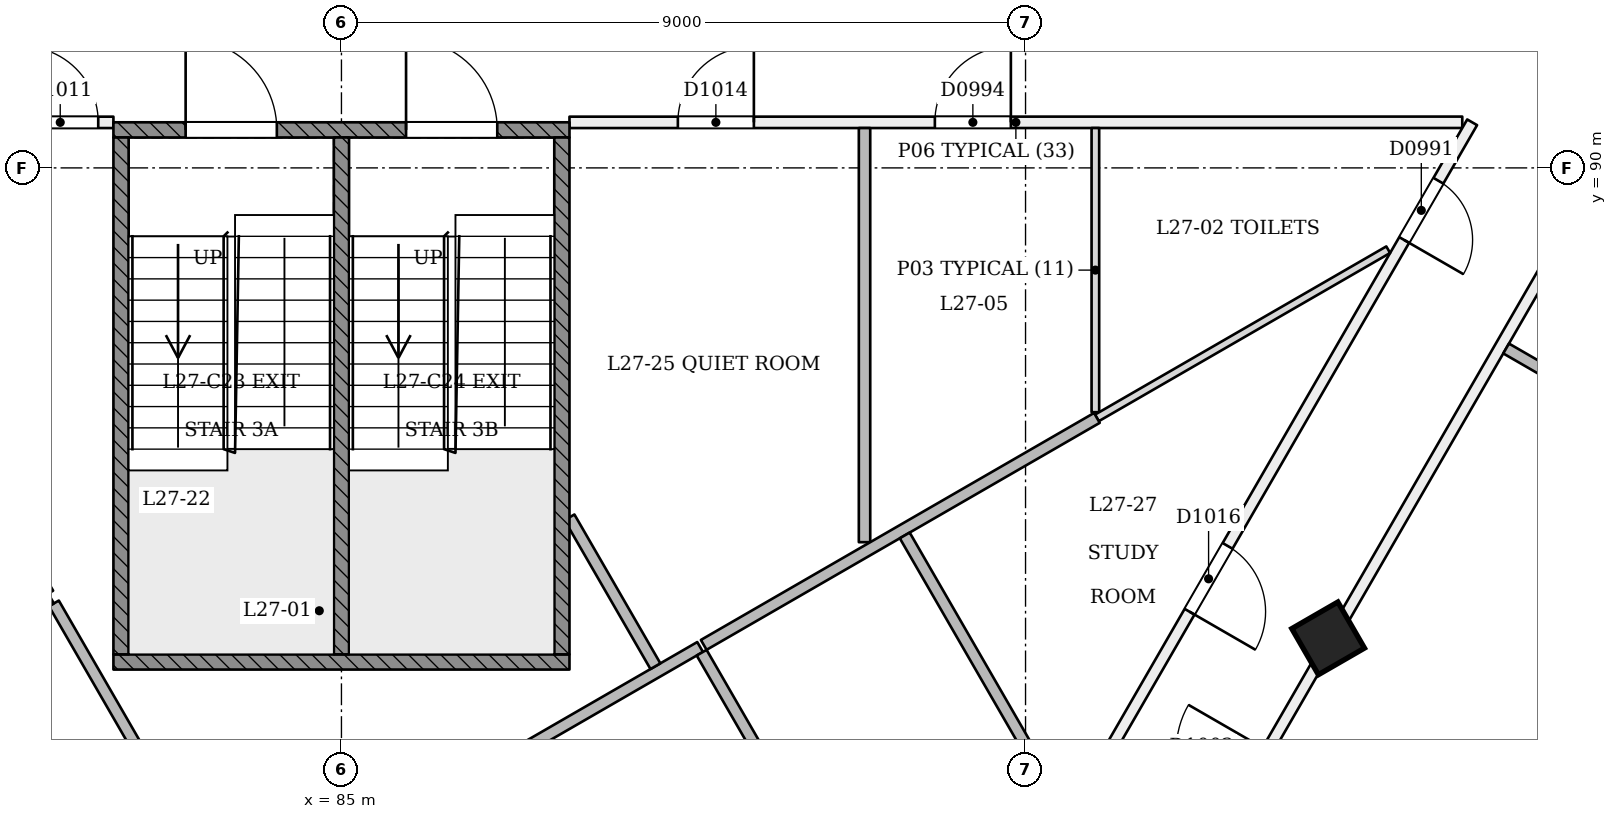
"""IFC4 building model, lengths in metres.
Left out: names, types, materials, properties, quantities, classifications, styles, units other than length and angle.
Written with IfcOpenShell. Run it as: python <this file> out.ifc"""

import sys

from ifc_helpers import new_model, si_unit, direction, frame, frame_2d, origin, origin_2d, place, context, subcontext, project, spatial, rectangle, extrude, element, fill, save


model = new_model("IFC4")
c1 = context("Model", 3, precision=1e-05, world=origin(), true_north=direction((0.0, 1.0)))
c2 = subcontext(c1, "Body", "Model", "MODEL_VIEW")
j1 = project(units=[si_unit("LENGTHUNIT", "METRE"), si_unit("PLANEANGLEUNIT", "RADIAN")], contexts=[c1])
p1 = place(None, origin())
s1 = spatial("IfcSite", under=j1, at=p1, CompositionType="ELEMENT")
p2 = place(p1, origin())
s2 = spatial("IfcBuilding", under=s1, at=p2, CompositionType="ELEMENT")
p3 = place(p2, frame((0.0, 0.0, 108.0)))
s3 = spatial("IfcBuildingStorey", under=s2, at=p3, CompositionType="ELEMENT", Elevation=108.0)
p4 = place(p3, frame((98.008, 83.764, -0.021), z_axis=(-0.022221406801, 0.038413224561, 0.999014831351), x_axis=(-0.499508315684, -0.866024881685, 0.022188890572)))
e1 = element("IfcColumn", 1, at=p4, inside=s3, PredefinedType="COLUMN", context=c2, shape_type="SweptSolid", body=[
    extrude(rectangle(XDim=0.7, YDim=0.7, at=origin_2d()), origin(), (0.0, 0.0, 1.0), 3.604),
])
p5 = place(p3, frame((88.0, 90.599, 0.0), z_axis=(0.0, 0.0, 1.0), x_axis=(0.999999996544, 8.3141069e-05, 0.0)))
e2 = element("IfcWall", 2, at=p5, inside=s3, PredefinedType="PARTITIONING", context=c2, shape_type="SweptSolid", body=[
    extrude(rectangle(XDim=11.746, YDim=0.15, at=frame_2d((5.873, 0.0))), origin(), (0.0, 0.0, 1.0), 3.1),
])
p6 = place(p5, frame((4.807, 0.0, 0.0)))
e3 = element("IfcOpeningElement", 3, at=p6, cuts=e2, PredefinedType="OPENING", context=c2, shape_type="SweptSolid", body=[
    extrude(rectangle(XDim=1.0, YDim=2.1, at=frame_2d((0.5, 1.05))), frame((0.0, 0.085, 0.0), z_axis=(0.0, -1.0, 0.0), x_axis=(1.0, 0.0, 0.0)), (0.0, 0.0, 1.0), 0.171),
])
p7 = place(p5, frame((1.426, 0.0, 0.0)))
e4 = element("IfcOpeningElement", 4, at=p7, cuts=e2, PredefinedType="OPENING", context=c2, shape_type="SweptSolid", body=[
    extrude(rectangle(XDim=1.0, YDim=2.1, at=frame_2d((0.5, 1.05))), frame((0.0, 0.085, 0.0), z_axis=(0.0, -1.0, 0.0), x_axis=(1.0, 0.0, 0.0)), (0.0, 0.0, 1.0), 0.171),
])
p8 = place(p3, frame((99.876, 90.6, 0.0), z_axis=(0.0, 0.0, 1.0), x_axis=(-0.499999508355, -0.866025687636, 0.0)))
e5 = element("IfcWall", 5, at=p8, inside=s3, PredefinedType="PARTITIONING", context=c2, shape_type="SweptSolid", body=[
    extrude(rectangle(XDim=29.622, YDim=0.15, at=frame_2d((14.811, 0.0))), origin(), (0.0, 0.0, 1.0), 3.1),
])
p9 = place(p8, frame((0.888, 0.0, 0.0)))
e6 = element("IfcOpeningElement", 6, at=p9, cuts=e5, PredefinedType="OPENING", context=c2, shape_type="SweptSolid", body=[
    extrude(rectangle(XDim=0.9, YDim=2.1, at=frame_2d((0.45, 1.05))), frame((0.0, 0.085, 0.0), z_axis=(0.0, -1.0, 0.0), x_axis=(1.0, 0.0, 0.0)), (0.0, 0.0, 1.0), 0.171),
])
p10 = place(p8, frame((19.95, 0.0, 0.0)))
e7 = element("IfcOpeningElement", 7, at=p10, cuts=e5, PredefinedType="OPENING", context=c2, shape_type="SweptSolid", body=[
    extrude(rectangle(XDim=1.0, YDim=2.1, at=frame_2d((0.5, 1.05))), frame((0.0, 0.085, 0.0), z_axis=(0.0, -1.0, 0.0), x_axis=(1.0, 0.0, 0.0)), (0.0, 0.0, 1.0), 0.171),
])
p11 = place(p8, frame((14.284, 0.0, 0.0)))
e8 = element("IfcOpeningElement", 8, at=p11, cuts=e5, PredefinedType="OPENING", context=c2, shape_type="SweptSolid", body=[
    extrude(rectangle(XDim=1.0, YDim=2.1, at=frame_2d((0.5, 1.05))), frame((0.0, 0.085, 0.0), z_axis=(0.0, -1.0, 0.0), x_axis=(1.0, 0.0, 0.0)), (0.0, 0.0, 1.0), 0.171),
])
p12 = place(p8, frame((6.435, 0.0, 0.0)))
e9 = element("IfcOpeningElement", 9, at=p12, cuts=e5, PredefinedType="OPENING", context=c2, shape_type="SweptSolid", body=[
    extrude(rectangle(XDim=1.0, YDim=2.1, at=frame_2d((0.5, 1.05))), frame((0.0, 0.085, 0.0), z_axis=(0.0, -1.0, 0.0), x_axis=(1.0, 0.0, 0.0)), (0.0, 0.0, 1.0), 0.171),
])
p13 = place(p8, frame((10.748, 0.0, 0.0)))
e10 = element("IfcOpeningElement", 10, at=p13, cuts=e5, PredefinedType="OPENING", context=c2, shape_type="SweptSolid", body=[
    extrude(rectangle(XDim=1.0, YDim=2.1, at=frame_2d((0.5, 1.05))), frame((0.0, 0.085, 0.0), z_axis=(0.0, -1.0, 0.0), x_axis=(1.0, 0.0, 0.0)), (0.0, 0.0, 1.0), 0.171),
])
p14 = place(p3, frame((63.866, 97.84, 0.0), z_axis=(0.0, 0.0, 1.0), x_axis=(0.499996899578, -0.866027193807, 0.0)))
e11 = element("IfcWall", 11, at=p14, inside=s3, PredefinedType="PARTITIONING", context=c2, shape_type="SweptSolid", body=[
    extrude(rectangle(XDim=41.505, YDim=0.15, at=frame_2d((20.752, 0.0))), origin(), (0.0, 0.0, 1.0), 2.7),
])
p15 = place(p14, frame((2.792, 0.0, 0.0)))
e12 = element("IfcOpeningElement", 12, at=p15, cuts=e11, PredefinedType="OPENING", context=c2, shape_type="SweptSolid", body=[
    extrude(rectangle(XDim=1.2, YDim=2.1, at=frame_2d((0.6, 1.05))), frame((0.0, 0.085, 0.0), z_axis=(0.0, -1.0, 0.0), x_axis=(1.0, 0.0, 0.0)), (0.0, 0.0, 1.0), 0.171),
])
p16 = place(p14, frame((11.153, 0.0, 0.0)))
e13 = element("IfcOpeningElement", 13, at=p16, cuts=e11, PredefinedType="OPENING", context=c2, shape_type="SweptSolid", body=[
    extrude(rectangle(XDim=1.2, YDim=2.1, at=frame_2d((0.6, 1.05))), frame((0.0, 0.085, 0.0), z_axis=(0.0, -1.0, 0.0), x_axis=(1.0, 0.0, 0.0)), (0.0, 0.0, 1.0), 0.171),
])
p17 = place(p14, frame((22.403, 0.0, 0.0)))
e14 = element("IfcOpeningElement", 14, at=p17, cuts=e11, PredefinedType="OPENING", context=c2, shape_type="SweptSolid", body=[
    extrude(rectangle(XDim=1.2, YDim=2.1, at=frame_2d((0.6, 1.05))), frame((0.0, 0.085, 0.0), z_axis=(0.0, -1.0, 0.0), x_axis=(1.0, 0.0, 0.0)), (0.0, 0.0, 1.0), 0.171),
])
p18 = place(p14, frame((32.553, 0.0, 0.0)))
e15 = element("IfcOpeningElement", 15, at=p18, cuts=e11, PredefinedType="OPENING", context=c2, shape_type="SweptSolid", body=[
    extrude(rectangle(XDim=1.2, YDim=2.1, at=frame_2d((0.6, 1.05))), frame((0.0, 0.085, 0.0), z_axis=(0.0, -1.0, 0.0), x_axis=(1.0, 0.0, 0.0)), (0.0, 0.0, 1.0), 0.171),
])
p19 = place(p14, frame((39.864, 0.0, 0.0)))
e16 = element("IfcOpeningElement", 16, at=p19, cuts=e11, PredefinedType="OPENING", context=c2, shape_type="SweptSolid", body=[
    extrude(rectangle(XDim=1.0, YDim=2.1, at=frame_2d((0.5, 1.05))), frame((0.0, 0.085, 0.0), z_axis=(0.0, -1.0, 0.0), x_axis=(1.0, 0.0, 0.0)), (0.0, 0.0, 1.0), 0.171),
])
p20 = place(p3, frame((85.381, 61.895, 0.0), z_axis=(0.0, 0.0, 1.0), x_axis=(0.499996899578, 0.866027193807, 0.0)))
e17 = element("IfcWall", 17, at=p20, inside=s3, PredefinedType="PARTITIONING", context=c2, shape_type="SweptSolid", body=[
    extrude(rectangle(XDim=41.505, YDim=0.15, at=frame_2d((20.752, 0.0))), origin(), (0.0, 0.0, 1.0), 2.7),
])
p21 = place(p20, frame((0.226, 0.0, 0.0)))
e18 = element("IfcOpeningElement", 18, at=p21, cuts=e17, PredefinedType="OPENING", context=c2, shape_type="SweptSolid", body=[
    extrude(rectangle(XDim=1.2, YDim=2.1, at=frame_2d((0.6, 1.05))), frame((0.0, 0.085, 0.0), z_axis=(0.0, -1.0, 0.0), x_axis=(1.0, 0.0, 0.0)), (0.0, 0.0, 1.0), 0.171),
])
p22 = place(p20, frame((8.903, 0.0, 0.0)))
e19 = element("IfcOpeningElement", 19, at=p22, cuts=e17, PredefinedType="OPENING", context=c2, shape_type="SweptSolid", body=[
    extrude(rectangle(XDim=1.2, YDim=2.1, at=frame_2d((0.6, 1.05))), frame((0.0, 0.085, 0.0), z_axis=(0.0, -1.0, 0.0), x_axis=(1.0, 0.0, 0.0)), (0.0, 0.0, 1.0), 0.171),
])
p23 = place(p20, frame((22.403, 0.0, 0.0)))
e20 = element("IfcOpeningElement", 20, at=p23, cuts=e17, PredefinedType="OPENING", context=c2, shape_type="SweptSolid", body=[
    extrude(rectangle(XDim=1.2, YDim=2.1, at=frame_2d((0.6, 1.05))), frame((0.0, 0.085, 0.0), z_axis=(0.0, -1.0, 0.0), x_axis=(1.0, 0.0, 0.0)), (0.0, 0.0, 1.0), 0.171),
])
p24 = place(p20, frame((32.553, 0.0, 0.0)))
e21 = element("IfcOpeningElement", 21, at=p24, cuts=e17, PredefinedType="OPENING", context=c2, shape_type="SweptSolid", body=[
    extrude(rectangle(XDim=1.2, YDim=2.1, at=frame_2d((0.6, 1.05))), frame((0.0, 0.085, 0.0), z_axis=(0.0, -1.0, 0.0), x_axis=(1.0, 0.0, 0.0)), (0.0, 0.0, 1.0), 0.171),
])
p25 = place(p20, frame((40.024, 0.0, 0.0)))
e22 = element("IfcOpeningElement", 22, at=p25, cuts=e17, PredefinedType="OPENING", context=c2, shape_type="SweptSolid", body=[
    extrude(rectangle(XDim=1.2, YDim=2.1, at=frame_2d((0.6, 1.05))), frame((0.0, 0.085, 0.0), z_axis=(0.0, -1.0, 0.0), x_axis=(1.0, 0.0, 0.0)), (0.0, 0.0, 1.0), 0.171),
])
p26 = place(p3, frame((85.0, 64.834, 0.0), z_axis=(0.0, 0.0, 1.0), x_axis=(-0.499998535175, 0.8660262495, 0.0)))
e23 = element("IfcWall", 23, at=p26, inside=s3, PredefinedType="PARTITIONING", context=c2, shape_type="SweptSolid", body=[
    extrude(rectangle(XDim=29.751, YDim=0.15, at=frame_2d((14.876, 0.0))), origin(), (0.0, 0.0, 1.0), 3.1),
])
p27 = place(p26, frame((11.629, 0.0, 0.0)))
e24 = element("IfcOpeningElement", 24, at=p27, cuts=e23, PredefinedType="OPENING", context=c2, shape_type="SweptSolid", body=[
    extrude(rectangle(XDim=1.2, YDim=2.1, at=frame_2d((0.6, 1.05))), frame((0.0, 0.085, 0.0), z_axis=(0.0, -1.0, 0.0), x_axis=(1.0, 0.0, 0.0)), (0.0, 0.0, 1.0), 0.171),
])
p28 = place(p26, frame((8.136, 0.0, 0.0)))
e25 = element("IfcOpeningElement", 25, at=p28, cuts=e23, PredefinedType="OPENING", context=c2, shape_type="SweptSolid", body=[
    extrude(rectangle(XDim=1.2, YDim=2.1, at=frame_2d((0.6, 1.05))), frame((0.0, 0.085, 0.0), z_axis=(0.0, -1.0, 0.0), x_axis=(1.0, 0.0, 0.0)), (0.0, 0.0, 1.0), 0.171),
])
p29 = place(p26, frame((15.887, 0.0, 0.0)))
e26 = element("IfcOpeningElement", 26, at=p29, cuts=e23, PredefinedType="OPENING", context=c2, shape_type="SweptSolid", body=[
    extrude(rectangle(XDim=1.0, YDim=2.1, at=frame_2d((0.5, 1.05))), frame((0.0, 0.085, 0.0), z_axis=(0.0, -1.0, 0.0), x_axis=(1.0, 0.0, 0.0)), (0.0, 0.0, 1.0), 0.171),
])
p30 = place(p26, frame((3.673, 0.0, 0.0)))
e27 = element("IfcOpeningElement", 27, at=p30, cuts=e23, PredefinedType="OPENING", context=c2, shape_type="SweptSolid", body=[
    extrude(rectangle(XDim=1.0, YDim=2.1, at=frame_2d((0.5, 1.05))), frame((0.0, 0.085, 0.0), z_axis=(0.0, -1.0, 0.0), x_axis=(1.0, 0.0, 0.0)), (0.0, 0.0, 1.0), 0.171),
])
p31 = place(p26, frame((20.45, 0.0, 0.0)))
e28 = element("IfcOpeningElement", 28, at=p31, cuts=e23, PredefinedType="OPENING", context=c2, shape_type="SweptSolid", body=[
    extrude(rectangle(XDim=1.0, YDim=2.1, at=frame_2d((0.5, 1.05))), frame((0.0, 0.085, 0.0), z_axis=(0.0, -1.0, 0.0), x_axis=(1.0, 0.0, 0.0)), (0.0, 0.0, 1.0), 0.171),
])
p32 = place(p26, frame((25.486, 0.0, 0.0)))
e29 = element("IfcOpeningElement", 29, at=p32, cuts=e23, PredefinedType="OPENING", context=c2, shape_type="SweptSolid", body=[
    extrude(rectangle(XDim=1.0, YDim=2.1, at=frame_2d((0.5, 1.05))), frame((0.0, 0.085, 0.0), z_axis=(0.0, -1.0, 0.0), x_axis=(1.0, 0.0, 0.0)), (0.0, 0.0, 1.0), 0.171),
])
p33 = place(p3, frame((70.254, 90.6, 0.0), z_axis=(0.0, 0.0, 1.0), x_axis=(0.999999996544, -8.3141069e-05, 0.0)))
e30 = element("IfcWall", 30, at=p33, inside=s3, PredefinedType="PARTITIONING", context=c2, shape_type="SweptSolid", body=[
    extrude(rectangle(XDim=11.746, YDim=0.15, at=frame_2d((5.873, 0.0))), origin(), (0.0, 0.0, 1.0), 3.1),
])
p34 = place(p33, frame((5.834, 0.0, 0.0)))
e31 = element("IfcOpeningElement", 31, at=p34, cuts=e30, PredefinedType="OPENING", context=c2, shape_type="SweptSolid", body=[
    extrude(rectangle(XDim=0.9, YDim=2.1, at=frame_2d((0.45, 1.05))), frame((0.0, 0.085, 0.0), z_axis=(0.0, -1.0, 0.0), x_axis=(1.0, 0.0, 0.0)), (0.0, 0.0, 1.0), 0.171),
])
p35 = place(p33, frame((10.546, 0.0, 0.0)))
e32 = element("IfcOpeningElement", 32, at=p35, cuts=e30, PredefinedType="OPENING", context=c2, shape_type="SweptSolid", body=[
    extrude(rectangle(XDim=1.0, YDim=2.1, at=frame_2d((0.5, 1.05))), frame((0.0, 0.085, 0.0), z_axis=(0.0, -1.0, 0.0), x_axis=(1.0, 0.0, 0.0)), (0.0, 0.0, 1.0), 0.171),
])
p36 = place(p3, frame((94.919, 90.525, 0.0), z_axis=(0.0, 0.0, 1.0), x_axis=(0.0, -1.0, 0.0)))
e33 = element("IfcWall", 33, at=p36, inside=s3, PredefinedType="PARTITIONING", context=c2, shape_type="SweptSolid", body=[
    extrude(rectangle(XDim=3.739, YDim=0.1, at=frame_2d((1.869, 0.0))), origin(), (0.0, 0.0, 1.0), 3.1),
])
p37 = place(p3, frame((94.939, 86.711, 0.0), z_axis=(0.0, 0.0, 1.0), x_axis=(0.86600735653, 0.500031257459, 0.0)))
e34 = element("IfcWall", 34, at=p37, inside=s3, PredefinedType="PARTITIONING", context=c2, shape_type="SweptSolid", body=[
    extrude(rectangle(XDim=4.426, YDim=0.1, at=frame_2d((2.213, 0.0))), origin(), (0.0, 0.0, 1.0), 3.1),
])
p38 = place(p3, frame((91.882, 90.524, 0.0), z_axis=(0.0, 0.0, 1.0), x_axis=(0.0, -1.0, 0.0)))
e35 = element("IfcWall", 35, at=p38, inside=s3, PredefinedType="PARTITIONING", context=c2, shape_type="SweptSolid", body=[
    extrude(rectangle(XDim=5.448, YDim=0.15, at=frame_2d((2.724, 0.0))), origin(), (0.0, 0.0, 1.0), 3.1),
])
p39 = place(p3, frame((89.766, 83.725, 0.0), z_axis=(0.0, 0.0, 1.0), x_axis=(0.866020851292, 0.500007885066, 0.0)))
e36 = element("IfcWall", 36, at=p39, inside=s3, PredefinedType="PARTITIONING", context=c2, shape_type="SweptSolid", body=[
    extrude(rectangle(XDim=5.973, YDim=0.15, at=frame_2d((2.986, 0.0))), origin(), (0.0, 0.0, 1.0), 3.1),
])
p40 = place(p3, frame((105.8, 84.461, 0.0), z_axis=(0.0, 0.0, 1.0), x_axis=(-0.866015887322, 0.500016482634, 0.0)))
e37 = element("IfcWall", 37, at=p40, inside=s3, PredefinedType="PARTITIONING", context=c2, shape_type="SweptSolid", body=[
    extrude(rectangle(XDim=6.325, YDim=0.15, at=frame_2d((3.163, 0.0))), origin(), (0.0, 0.0, 1.0), 2.6),
])
p41 = place(p3, frame((89.719, 83.697, 0.0), z_axis=(0.0, 0.0, 1.0), x_axis=(-0.866020451134, -0.500008578143, 0.0)))
e38 = element("IfcWall", 38, at=p41, inside=s3, PredefinedType="PARTITIONING", context=c2, shape_type="SweptSolid", body=[
    extrude(rectangle(XDim=13.443, YDim=0.15, at=frame_2d((6.721, 0.0))), origin(), (0.0, 0.0, 1.0), 3.1),
])
p42 = place(p3, frame((92.728, 78.445, 0.0), z_axis=(0.0, 0.0, 1.0), x_axis=(-0.500004068591, 0.86602305477, 0.0)))
e39 = element("IfcWall", 39, at=p42, inside=s3, PredefinedType="PARTITIONING", context=c2, shape_type="SweptSolid", body=[
    extrude(rectangle(XDim=5.979, YDim=0.15, at=frame_2d((2.989, 0.0))), origin(), (0.0, 0.0, 1.0), 3.1),
])
p43 = place(p3, frame((83.553, 80.224, 0.0), z_axis=(0.0, 0.0, 1.0), x_axis=(-0.499999868264, 0.866025479842, 0.0)))
e40 = element("IfcWall", 40, at=p43, inside=s3, PredefinedType="PARTITIONING", context=c2, shape_type="SweptSolid", body=[
    extrude(rectangle(XDim=4.672, YDim=0.15, at=frame_2d((2.336, 0.0))), origin(), (0.0, 0.0, 1.0), 3.1),
])
p44 = place(p3, frame((81.179, 84.335, 0.0), z_axis=(0.0, 0.0, 1.0), x_axis=(-0.866023385972, -0.500003494938, 0.0)))
e41 = element("IfcWall", 41, at=p44, inside=s3, PredefinedType="PARTITIONING", context=c2, shape_type="SweptSolid", body=[
    extrude(rectangle(XDim=6.367, YDim=0.15, at=frame_2d((3.183, 0.0))), origin(), (0.0, 0.0, 1.0), 3.1),
])
p45 = place(p3, frame((79.028, 88.061, 0.0), z_axis=(0.0, 0.0, 1.0), x_axis=(0.500009099585, -0.866020150073, 0.0)))
e42 = element("IfcWall", 42, at=p45, inside=s3, PredefinedType="PARTITIONING", context=c2, shape_type="SweptSolid", body=[
    extrude(rectangle(XDim=4.227, YDim=0.15, at=frame_2d((2.114, 0.0))), origin(), (0.0, 0.0, 1.0), 3.1),
])
p46 = place(p3, frame((89.131, 83.444, 0.0), z_axis=(0.0, 0.0, 1.0), x_axis=(-0.500040169509, 0.866002210665, 0.0)))
e43 = element("IfcWall", 43, at=p46, inside=s3, PredefinedType="PARTITIONING", context=c2, shape_type="SweptSolid", body=[
    extrude(rectangle(XDim=2.261, YDim=0.15, at=frame_2d((1.131, 0.0))), origin(), (0.0, 0.0, 1.0), 3.1),
])
p47 = place(p3, frame((92.411, 85.165, 0.0), z_axis=(0.0, 0.0, 1.0), x_axis=(0.499974224157, -0.866040284963, 0.0)))
e44 = element("IfcWall", 44, at=p47, inside=s3, PredefinedType="PARTITIONING", context=c2, shape_type="SweptSolid", body=[
    extrude(rectangle(XDim=4.197, YDim=0.15, at=frame_2d((2.099, 0.0))), origin(), (0.0, 0.0, 1.0), 3.1),
])
p48 = place(p3, frame((82.0, 90.5, 0.0), z_axis=(0.0, 0.0, 1.0), x_axis=(1.0, 0.0, 0.0)))
e45 = element("IfcWall", 45, at=p48, inside=s3, PredefinedType="SOLIDWALL", context=c2, shape_type="SweptSolid", body=[
    extrude(rectangle(XDim=6.0, YDim=0.2, at=frame_2d((3.0, 0.0))), origin(), (0.0, 0.0, 1.0), 3.1),
])
p49 = place(p48, frame((0.95, 0.0, 0.0)))
e46 = element("IfcOpeningElement", 46, at=p49, cuts=e45, PredefinedType="OPENING", context=c2, shape_type="SweptSolid", body=[
    extrude(rectangle(XDim=1.2, YDim=2.1, at=frame_2d((0.6, 1.05))), frame((0.0, 0.11, 0.0), z_axis=(0.0, -1.0, 0.0), x_axis=(1.0, 0.0, 0.0)), (0.0, 0.0, 1.0), 0.221),
])
p50 = place(p48, frame((3.85, 0.0, 0.0)))
e47 = element("IfcOpeningElement", 47, at=p50, cuts=e45, PredefinedType="OPENING", context=c2, shape_type="SweptSolid", body=[
    extrude(rectangle(XDim=1.2, YDim=2.1, at=frame_2d((0.6, 1.05))), frame((0.0, 0.11, 0.0), z_axis=(0.0, -1.0, 0.0), x_axis=(1.0, 0.0, 0.0)), (0.0, 0.0, 1.0), 0.221),
])
p51 = place(p3, frame((82.0, 83.5, 0.0), z_axis=(0.0, 0.0, 1.0), x_axis=(1.0, 0.0, 0.0)))
e48 = element("IfcWall", 48, at=p51, inside=s3, PredefinedType="SOLIDWALL", context=c2, shape_type="SweptSolid", body=[
    extrude(rectangle(XDim=6.0, YDim=0.2, at=frame_2d((3.0, 0.0))), origin(), (0.0, 0.0, 1.0), 3.1),
])
for number, where, z_axis, x_axis in (
    (49, (82.1, 83.6, 0.0), (0.0, 0.0, 1.0), (0.0, 1.0, 0.0)),
    (50, (87.9, 83.6, 0.0), (0.0, 0.0, 1.0), (0.0, 1.0, 0.0)),
    (51, (85.0, 83.6, 0.0), (0.0, 0.0, 1.0), (0.0, 1.0, 0.0)),
):
    element("IfcWall", number, at=place(p3, frame(where, z_axis=z_axis, x_axis=x_axis)), inside=s3, PredefinedType="SOLIDWALL", context=c2, shape_type="SweptSolid", body=[
        extrude(rectangle(XDim=6.8, YDim=0.2, at=frame_2d((3.4, 0.0))), origin(), (0.0, 0.0, 1.0), 3.1),
    ])
p52 = place(p9, origin())
e52 = element("IfcDoor", 52, at=p52, inside=s3, OperationType="SINGLE_SWING_RIGHT", PredefinedType="NOTDEFINED", context=c2, shape_type="SweptSolid", body=[
    extrude(rectangle(XDim=0.9, YDim=2.1, at=frame_2d((0.45, 1.05))), frame((0.0, 0.025, 0.0), z_axis=(0.0, -1.0, 0.0), x_axis=(1.0, 0.0, 0.0)), (0.0, 0.0, 1.0), 0.05),
])
fill(e6, e52)
p53 = place(p6, origin())
e53 = element("IfcDoor", 53, at=p53, inside=s3, OperationType="SINGLE_SWING_RIGHT", PredefinedType="NOTDEFINED", context=c2, shape_type="SweptSolid", body=[
    extrude(rectangle(XDim=1.0, YDim=2.1, at=frame_2d((0.5, 1.05))), frame((0.0, 0.025, 0.0), z_axis=(0.0, -1.0, 0.0), x_axis=(1.0, 0.0, 0.0)), (0.0, 0.0, 1.0), 0.05),
])
fill(e3, e53)
p54 = place(p35, origin())
e54 = element("IfcDoor", 54, at=p54, inside=s3, OperationType="SINGLE_SWING_LEFT", PredefinedType="NOTDEFINED", context=c2, shape_type="SweptSolid", body=[
    extrude(rectangle(XDim=1.0, YDim=2.1, at=frame_2d((0.5, 1.05))), frame((0.0, 0.025, 0.0), z_axis=(0.0, -1.0, 0.0), x_axis=(1.0, 0.0, 0.0)), (0.0, 0.0, 1.0), 0.05),
])
fill(e32, e54)
p55 = place(p7, origin())
e55 = element("IfcDoor", 55, at=p55, inside=s3, OperationType="SINGLE_SWING_RIGHT", PredefinedType="NOTDEFINED", context=c2, shape_type="SweptSolid", body=[
    extrude(rectangle(XDim=1.0, YDim=2.1, at=frame_2d((0.5, 1.05))), frame((0.0, 0.025, 0.0), z_axis=(0.0, -1.0, 0.0), x_axis=(1.0, 0.0, 0.0)), (0.0, 0.0, 1.0), 0.05),
])
fill(e4, e55)
p56 = place(p12, origin())
e56 = element("IfcDoor", 56, at=p56, inside=s3, OperationType="SINGLE_SWING_RIGHT", PredefinedType="NOTDEFINED", context=c2, shape_type="SweptSolid", body=[
    extrude(rectangle(XDim=1.0, YDim=2.1, at=frame_2d((0.5, 1.05))), frame((0.0, 0.025, 0.0), z_axis=(0.0, -1.0, 0.0), x_axis=(1.0, 0.0, 0.0)), (0.0, 0.0, 1.0), 0.05),
])
fill(e9, e56)
p57 = place(p49, origin())
e57 = element("IfcDoor", 57, at=p57, inside=s3, OperationType="SINGLE_SWING_LEFT", PredefinedType="NOTDEFINED", context=c2, shape_type="SweptSolid", body=[
    extrude(rectangle(XDim=1.2, YDim=2.1, at=frame_2d((0.6, 1.05))), frame((0.0, 0.025, 0.0), z_axis=(0.0, -1.0, 0.0), x_axis=(1.0, 0.0, 0.0)), (0.0, 0.0, 1.0), 0.05),
])
fill(e46, e57)
p58 = place(p50, origin())
e58 = element("IfcDoor", 58, at=p58, inside=s3, OperationType="SINGLE_SWING_LEFT", PredefinedType="NOTDEFINED", context=c2, shape_type="SweptSolid", body=[
    extrude(rectangle(XDim=1.2, YDim=2.1, at=frame_2d((0.6, 1.05))), frame((0.0, 0.025, 0.0), z_axis=(0.0, -1.0, 0.0), x_axis=(1.0, 0.0, 0.0)), (0.0, 0.0, 1.0), 0.05),
])
fill(e47, e58)
save(model, sys.argv[1])
